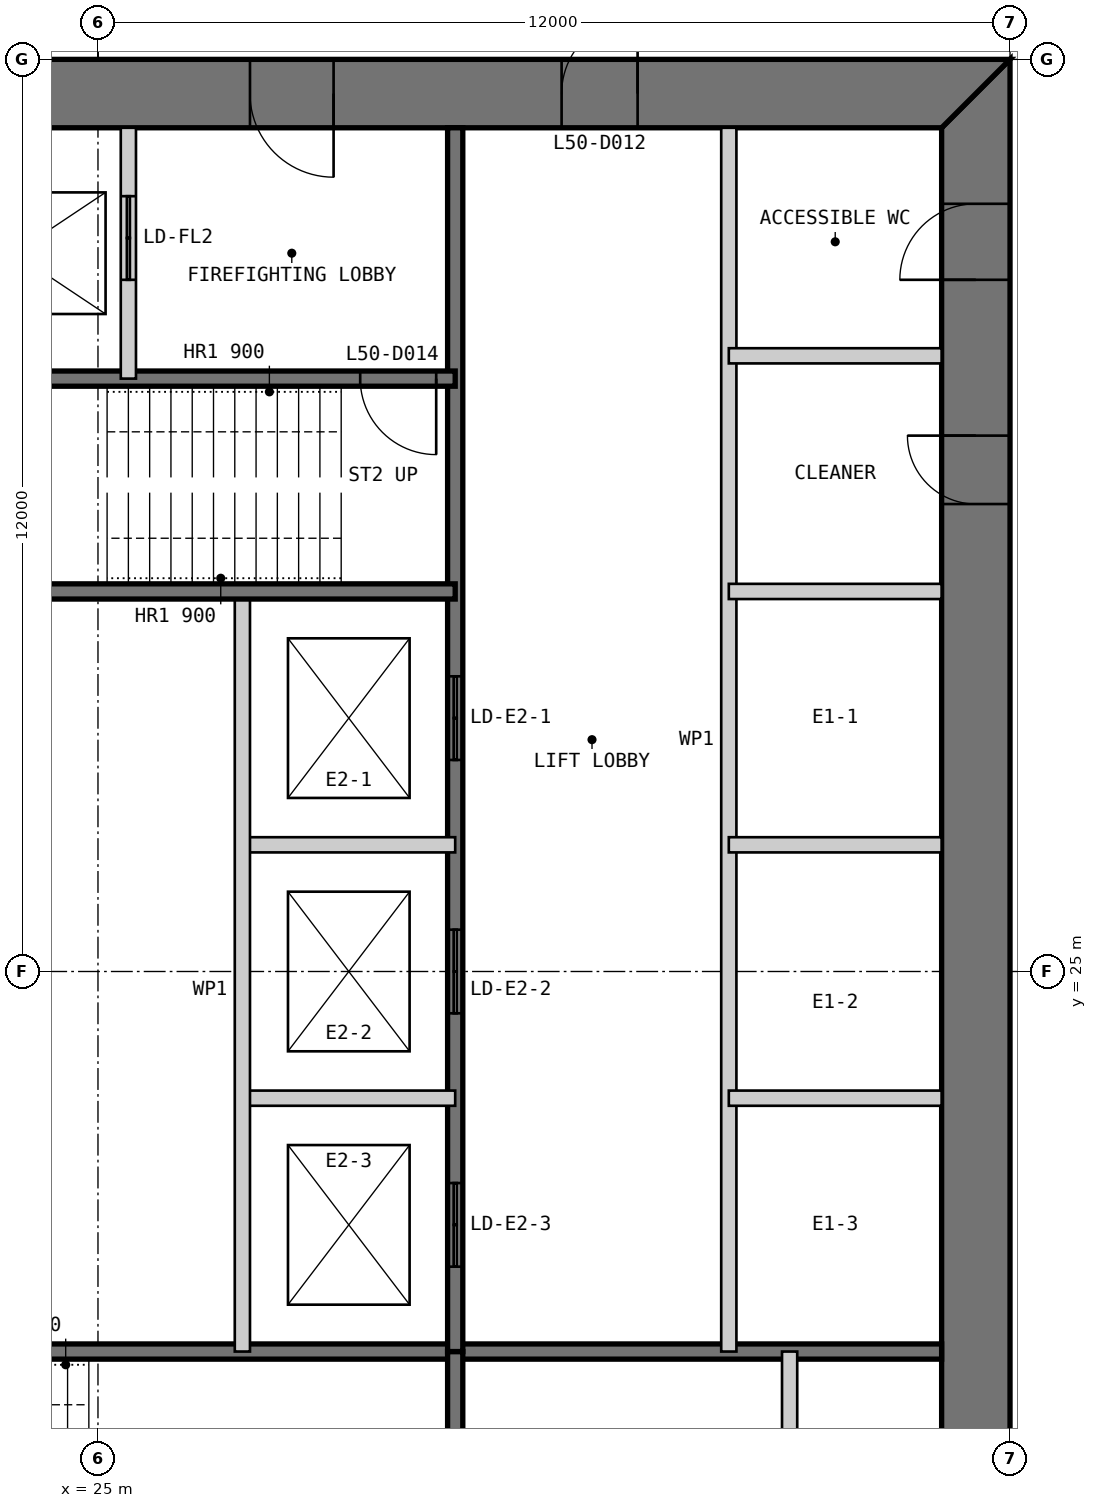
"""IFC4 building model, lengths in metres.
Left out: names, types, materials, properties, quantities, classifications, styles, units other than length and angle.
Written with IfcOpenShell. Run it as: python <this file> out.ifc"""

import sys

from ifc_helpers import new_model, si_unit, direction, frame, frame_2d, origin, place, context, subcontext, project, spatial, polyline, rectangle, outline, extrude, element, fill, save


model = new_model("IFC4")
c1 = context("Model", 3, precision=1e-05, world=origin(), true_north=direction((0.0, 1.0)))
c2 = subcontext(c1, "Body", "Model", "MODEL_VIEW")
j1 = project(units=[si_unit("LENGTHUNIT", "METRE"), si_unit("PLANEANGLEUNIT", "RADIAN")], contexts=[c1])
p1 = place(None, origin())
s1 = spatial("IfcSite", under=j1, at=p1, CompositionType="ELEMENT")
p2 = place(p1, origin())
s2 = spatial("IfcBuilding", under=s1, at=p2, CompositionType="ELEMENT")
p3 = place(p2, frame((0.0, 0.0, 213.8)))
s3 = spatial("IfcBuildingStorey", under=s2, at=p3, CompositionType="ELEMENT", Elevation=213.8)
p4 = place(p3, frame((36.55, 13.9, 0.0), z_axis=(0.0, 0.0, 1.0), x_axis=(0.0, 1.0, 0.0)))
e1 = element("IfcWall", 1, at=p4, inside=s3, PredefinedType="SHEAR", context=c2, shape_type="SweptSolid", body=[
    extrude(outline(polyline([(-0.9, -0.45), (23.1, -0.45), (22.2, 0.45), (0.0, 0.45), (-0.9, -0.45)])), origin(), (0.0, 0.0, 1.0), 4.0),
])
p5 = place(p4, frame((20.2, 0.0, 0.0)))
e2 = element("IfcOpeningElement", 2, at=p5, cuts=e1, PredefinedType="OPENING", context=c2, shape_type="SweptSolid", body=[
    extrude(rectangle(XDim=1.0, YDim=2.2, at=frame_2d((0.5, 1.1))), frame((0.0, 0.46, 0.0), z_axis=(0.0, -1.0, 0.0), x_axis=(1.0, 0.0, 0.0)), (0.0, 0.0, 1.0), 0.92),
])
p6 = place(p4, frame((17.25, 0.0, 0.0)))
e3 = element("IfcOpeningElement", 3, at=p6, cuts=e1, PredefinedType="OPENING", context=c2, shape_type="SweptSolid", body=[
    extrude(rectangle(XDim=0.9, YDim=2.2, at=frame_2d((0.45, 1.1))), frame((0.0, 0.46, 0.0), z_axis=(0.0, -1.0, 0.0), x_axis=(1.0, 0.0, 0.0)), (0.0, 0.0, 1.0), 0.92),
])
p7 = place(p3, frame((37.0, 36.55, 0.0), z_axis=(0.0, 0.0, 1.0), x_axis=(-1.0, 0.0, 0.0)))
e4 = element("IfcWall", 4, at=p7, inside=s3, PredefinedType="SHEAR", context=c2, shape_type="SweptSolid", body=[
    extrude(outline(polyline([(0.0, -0.45), (24.0, -0.45), (23.1, 0.45), (0.9, 0.45), (0.0, -0.45)])), origin(), (0.0, 0.0, 1.0), 4.0),
])
p8 = place(p7, frame((4.9, 0.0, 0.0)))
e5 = element("IfcOpeningElement", 5, at=p8, cuts=e4, PredefinedType="OPENING", context=c2, shape_type="SweptSolid", body=[
    extrude(rectangle(XDim=1.0, YDim=2.2, at=frame_2d((0.5, 1.1))), frame((0.0, 0.46, 0.0), z_axis=(0.0, -1.0, 0.0), x_axis=(1.0, 0.0, 0.0)), (0.0, 0.0, 1.0), 0.92),
])
p9 = place(p7, frame((8.9, 0.0, 0.0)))
e6 = element("IfcOpeningElement", 6, at=p9, cuts=e4, PredefinedType="OPENING", context=c2, shape_type="SweptSolid", body=[
    extrude(rectangle(XDim=1.1, YDim=2.2, at=frame_2d((0.55, 1.1))), frame((0.0, 0.46, 0.0), z_axis=(0.0, -1.0, 0.0), x_axis=(1.0, 0.0, 0.0)), (0.0, 0.0, 1.0), 0.92),
])
p10 = place(p7, frame((15.05, 0.0, 0.0)))
e7 = element("IfcOpeningElement", 7, at=p10, cuts=e4, PredefinedType="OPENING", context=c2, shape_type="SweptSolid", body=[
    extrude(rectangle(XDim=0.9, YDim=2.2, at=frame_2d((0.45, 1.1))), frame((0.0, 0.46, 0.0), z_axis=(0.0, -1.0, 0.0), x_axis=(1.0, 0.0, 0.0)), (0.0, 0.0, 1.0), 0.92),
])
p11 = place(p7, frame((17.9, 0.0, 0.0)))
e8 = element("IfcOpeningElement", 8, at=p11, cuts=e4, PredefinedType="OPENING", context=c2, shape_type="SweptSolid", body=[
    extrude(rectangle(XDim=1.0, YDim=2.2, at=frame_2d((0.5, 1.1))), frame((0.0, 0.46, 0.0), z_axis=(0.0, -1.0, 0.0), x_axis=(1.0, 0.0, 0.0)), (0.0, 0.0, 1.0), 0.92),
])
p12 = place(p7, frame((21.4, 0.0, 0.0)))
e9 = element("IfcOpeningElement", 9, at=p12, cuts=e4, PredefinedType="OPENING", context=c2, shape_type="SweptSolid", body=[
    extrude(rectangle(XDim=1.0, YDim=2.2, at=frame_2d((0.5, 1.1))), frame((0.0, 0.46, 0.0), z_axis=(0.0, -1.0, 0.0), x_axis=(1.0, 0.0, 0.0)), (0.0, 0.0, 1.0), 0.92),
])
p13 = place(p3, frame((20.3, 20.0, 0.0), z_axis=(0.0, 0.0, 1.0), x_axis=(1.0, 0.0, 0.0)))
e10 = element("IfcWall", 10, at=p13, inside=s3, PredefinedType="SOLIDWALL", context=c2, shape_type="SweptSolid", body=[
    extrude(rectangle(XDim=15.8, YDim=0.2, at=frame_2d((7.9, 0.0))), origin(), (0.0, 0.0, 1.0), 3.8),
])
p14 = place(p3, frame((29.7, 13.9, 0.0), z_axis=(0.0, 0.0, 1.0), x_axis=(0.0, 1.0, 0.0)))
e11 = element("IfcWall", 11, at=p14, inside=s3, PredefinedType="SOLIDWALL", context=c2, shape_type="SweptSolid", body=[
    extrude(rectangle(XDim=6.1, YDim=0.2, at=frame_2d((3.05, 0.0))), origin(), (0.0, 0.0, 1.0), 3.8),
])
p15 = place(p3, frame((34.1, 13.9, 0.0), z_axis=(0.0, 0.0, 1.0), x_axis=(0.0, 1.0, 0.0)))
e12 = element("IfcWall", 12, at=p15, inside=s3, PredefinedType="PARTITIONING", context=c2, shape_type="SweptSolid", body=[
    extrude(rectangle(XDim=6.1, YDim=0.2, at=frame_2d((3.05, 0.0))), origin(), (0.0, 0.0, 1.0), 3.8),
])
p16 = place(p3, frame((33.3, 36.1, 0.0), z_axis=(0.0, 0.0, 1.0), x_axis=(0.0, -1.0, 0.0)))
e13 = element("IfcWall", 13, at=p16, inside=s3, PredefinedType="PARTITIONING", context=c2, shape_type="SweptSolid", body=[
    extrude(rectangle(XDim=16.1, YDim=0.2, at=frame_2d((8.05, 0.0))), origin(), (0.0, 0.0, 1.0), 3.8),
])
p17 = place(p3, frame((29.7, 36.1, 0.0), z_axis=(0.0, 0.0, 1.0), x_axis=(0.0, -1.0, 0.0)))
e14 = element("IfcWall", 14, at=p17, inside=s3, PredefinedType="SOLIDWALL", context=c2, shape_type="SweptSolid", body=[
    extrude(rectangle(XDim=16.1, YDim=0.2, at=frame_2d((8.05, 0.0))), origin(), (0.0, 0.0, 1.0), 3.8),
])
p18 = place(p17, frame((7.217, 0.0, 0.0)))
e15 = element("IfcOpeningElement", 15, at=p18, cuts=e14, PredefinedType="OPENING", context=c2, shape_type="SweptSolid", body=[
    extrude(rectangle(XDim=1.1, YDim=2.2, at=frame_2d((0.55, 1.1))), frame((0.0, 0.11, 0.0), z_axis=(0.0, -1.0, 0.0), x_axis=(1.0, 0.0, 0.0)), (0.0, 0.0, 1.0), 0.22),
])
p19 = place(p17, frame((10.55, 0.0, 0.0)))
e16 = element("IfcOpeningElement", 16, at=p19, cuts=e14, PredefinedType="OPENING", context=c2, shape_type="SweptSolid", body=[
    extrude(rectangle(XDim=1.1, YDim=2.2, at=frame_2d((0.55, 1.1))), frame((0.0, 0.11, 0.0), z_axis=(0.0, -1.0, 0.0), x_axis=(1.0, 0.0, 0.0)), (0.0, 0.0, 1.0), 0.22),
])
p20 = place(p17, frame((13.883, 0.0, 0.0)))
e17 = element("IfcOpeningElement", 17, at=p20, cuts=e14, PredefinedType="OPENING", context=c2, shape_type="SweptSolid", body=[
    extrude(rectangle(XDim=1.1, YDim=2.2, at=frame_2d((0.55, 1.1))), frame((0.0, 0.11, 0.0), z_axis=(0.0, -1.0, 0.0), x_axis=(1.0, 0.0, 0.0)), (0.0, 0.0, 1.0), 0.22),
])
for number, where, z_axis, x_axis in (
    (18, (36.1, 30.0, 0.0), (0.0, 0.0, 1.0), (-1.0, 0.0, 0.0)),
    (19, (36.1, 26.667, 0.0), (0.0, 0.0, 1.0), (-1.0, 0.0, 0.0)),
    (20, (36.1, 23.333, 0.0), (0.0, 0.0, 1.0), (-1.0, 0.0, 0.0)),
    (21, (29.7, 26.667, 0.0), (0.0, 0.0, 1.0), (-1.0, 0.0, 0.0)),
    (22, (29.7, 23.333, 0.0), (0.0, 0.0, 1.0), (-1.0, 0.0, 0.0)),
):
    element("IfcWall", number, at=place(p3, frame(where, z_axis=z_axis, x_axis=x_axis)), inside=s3, PredefinedType="PARTITIONING", context=c2, shape_type="SweptSolid", body=[
        extrude(rectangle(XDim=2.8, YDim=0.2, at=frame_2d((1.4, 0.0))), origin(), (0.0, 0.0, 1.0), 3.8),
    ])
p21 = place(p3, frame((26.9, 30.0, 0.0), z_axis=(0.0, 0.0, 1.0), x_axis=(0.0, -1.0, 0.0)))
e23 = element("IfcWall", 23, at=p21, inside=s3, PredefinedType="PARTITIONING", context=c2, shape_type="SweptSolid", body=[
    extrude(rectangle(XDim=10.0, YDim=0.2, at=frame_2d((5.0, 0.0))), origin(), (0.0, 0.0, 1.0), 3.8),
])
p22 = place(p3, frame((29.7, 32.8, 0.0), z_axis=(0.0, 0.0, 1.0), x_axis=(-1.0, 0.0, 0.0)))
e24 = element("IfcWall", 24, at=p22, inside=s3, PredefinedType="SOLIDWALL", context=c2, shape_type="SweptSolid", body=[
    extrude(rectangle(XDim=9.4, YDim=0.2, at=frame_2d((4.7, 0.0))), origin(), (0.0, 0.0, 1.0), 3.8),
])
p23 = place(p22, frame((0.25, 0.0, 0.0)))
e25 = element("IfcOpeningElement", 25, at=p23, cuts=e24, PredefinedType="OPENING", context=c2, shape_type="SweptSolid", body=[
    extrude(rectangle(XDim=1.0, YDim=2.2, at=frame_2d((0.5, 1.1))), frame((0.0, 0.11, 0.0), z_axis=(0.0, -1.0, 0.0), x_axis=(1.0, 0.0, 0.0)), (0.0, 0.0, 1.0), 0.22),
])
p24 = place(p3, frame((29.7, 30.0, 0.0), z_axis=(0.0, 0.0, 1.0), x_axis=(-1.0, 0.0, 0.0)))
e26 = element("IfcWall", 26, at=p24, inside=s3, PredefinedType="SOLIDWALL", context=c2, shape_type="SweptSolid", body=[
    extrude(rectangle(XDim=15.8, YDim=0.2, at=frame_2d((7.9, 0.0))), origin(), (0.0, 0.0, 1.0), 3.8),
])
p25 = place(p3, frame((25.4, 36.1, 0.0), z_axis=(0.0, 0.0, 1.0), x_axis=(0.0, -1.0, 0.0)))
e27 = element("IfcWall", 27, at=p25, inside=s3, PredefinedType="PARTITIONING", context=c2, shape_type="SweptSolid", body=[
    extrude(rectangle(XDim=3.3, YDim=0.2, at=frame_2d((1.65, 0.0))), origin(), (0.0, 0.0, 1.0), 3.8),
])
p26 = place(p25, frame((0.9, 0.0, 0.0)))
e28 = element("IfcOpeningElement", 28, at=p26, cuts=e27, PredefinedType="OPENING", context=c2, shape_type="SweptSolid", body=[
    extrude(rectangle(XDim=1.1, YDim=2.2, at=frame_2d((0.55, 1.1))), frame((0.0, 0.11, 0.0), z_axis=(0.0, -1.0, 0.0), x_axis=(1.0, 0.0, 0.0)), (0.0, 0.0, 1.0), 0.22),
])
p27 = place(p3, frame((36.1, 33.1, 0.0), z_axis=(0.0, 0.0, 1.0), x_axis=(-1.0, 0.0, 0.0)))
e29 = element("IfcWall", 29, at=p27, inside=s3, PredefinedType="PARTITIONING", context=c2, shape_type="SweptSolid", body=[
    extrude(rectangle(XDim=2.8, YDim=0.2, at=frame_2d((1.4, 0.0))), origin(), (0.0, 0.0, 1.0), 3.8),
])
p28 = place(p8, frame((1.0, 0.0, 0.0), z_axis=(0.0, 0.0, 1.0), x_axis=(-1.0, 0.0, 0.0)))
e30 = element("IfcDoor", 30, at=p28, inside=s3, OperationType="SINGLE_SWING_RIGHT", PredefinedType="DOOR", context=c2, shape_type="SweptSolid", body=[
    extrude(rectangle(XDim=1.0, YDim=2.2, at=frame_2d((0.5, 1.1))), frame((0.0, 0.025, 0.0), z_axis=(0.0, -1.0, 0.0), x_axis=(1.0, 0.0, 0.0)), (0.0, 0.0, 1.0), 0.05),
    extrude(outline(polyline([(0.0, 0.0), (0.04, 0.0), (0.04, 2.16), (0.96, 2.16), (0.96, 0.0), (1.0, 0.0), (1.0, 2.2), (0.0, 2.2), (0.0, 0.0)])), frame((0.0, 0.3, 0.0), z_axis=(0.0, -1.0, 0.0), x_axis=(1.0, 0.0, 0.0)), (0.0, 0.0, 1.0), 0.6),
])
fill(e5, e30)
p29 = place(p9, origin())
e31 = element("IfcDoor", 31, at=p29, inside=s3, OperationType="SINGLE_SWING_LEFT", PredefinedType="DOOR", context=c2, shape_type="SweptSolid", body=[
    extrude(rectangle(XDim=1.1, YDim=2.2, at=frame_2d((0.55, 1.1))), frame((0.0, 0.025, 0.0), z_axis=(0.0, -1.0, 0.0), x_axis=(1.0, 0.0, 0.0)), (0.0, 0.0, 1.0), 0.05),
    extrude(outline(polyline([(0.0, 0.0), (0.04, 0.0), (0.04, 2.16), (1.06, 2.16), (1.06, 0.0), (1.1, 0.0), (1.1, 2.2), (0.0, 2.2), (0.0, 0.0)])), frame((0.0, 0.3, 0.0), z_axis=(0.0, -1.0, 0.0), x_axis=(1.0, 0.0, 0.0)), (0.0, 0.0, 1.0), 0.6),
])
fill(e6, e31)
p30 = place(p23, origin())
e32 = element("IfcDoor", 32, at=p30, inside=s3, OperationType="SINGLE_SWING_LEFT", PredefinedType="DOOR", context=c2, shape_type="SweptSolid", body=[
    extrude(rectangle(XDim=1.0, YDim=2.2, at=frame_2d((0.5, 1.1))), frame((0.0, 0.025, 0.0), z_axis=(0.0, -1.0, 0.0), x_axis=(1.0, 0.0, 0.0)), (0.0, 0.0, 1.0), 0.05),
])
fill(e25, e32)
p31 = place(p5, origin())
e33 = element("IfcDoor", 33, at=p31, inside=s3, OperationType="SINGLE_SWING_LEFT", PredefinedType="DOOR", context=c2, shape_type="SweptSolid", body=[
    extrude(rectangle(XDim=1.0, YDim=2.2, at=frame_2d((0.5, 1.1))), frame((0.0, 0.025, 0.0), z_axis=(0.0, -1.0, 0.0), x_axis=(1.0, 0.0, 0.0)), (0.0, 0.0, 1.0), 0.05),
    extrude(outline(polyline([(0.0, 0.0), (0.04, 0.0), (0.04, 2.16), (0.96, 2.16), (0.96, 0.0), (1.0, 0.0), (1.0, 2.2), (0.0, 2.2), (0.0, 0.0)])), frame((0.0, 0.3, 0.0), z_axis=(0.0, -1.0, 0.0), x_axis=(1.0, 0.0, 0.0)), (0.0, 0.0, 1.0), 0.6),
])
fill(e2, e33)
p32 = place(p6, origin())
e34 = element("IfcDoor", 34, at=p32, inside=s3, OperationType="SINGLE_SWING_RIGHT", PredefinedType="DOOR", context=c2, shape_type="SweptSolid", body=[
    extrude(rectangle(XDim=0.9, YDim=2.2, at=frame_2d((0.45, 1.1))), frame((0.0, 0.025, 0.0), z_axis=(0.0, -1.0, 0.0), x_axis=(1.0, 0.0, 0.0)), (0.0, 0.0, 1.0), 0.05),
    extrude(outline(polyline([(0.0, 0.0), (0.04, 0.0), (0.04, 2.16), (0.86, 2.16), (0.86, 0.0), (0.9, 0.0), (0.9, 2.2), (0.0, 2.2), (0.0, 0.0)])), frame((0.0, 0.3, 0.0), z_axis=(0.0, -1.0, 0.0), x_axis=(1.0, 0.0, 0.0)), (0.0, 0.0, 1.0), 0.6),
])
fill(e3, e34)
p33 = place(p26, origin())
e35 = element("IfcDoor", 35, at=p33, inside=s3, OperationType="DOUBLE_DOOR_SLIDING", PredefinedType="DOOR", context=c2, shape_type="SweptSolid", body=[
    extrude(rectangle(XDim=1.1, YDim=2.2, at=frame_2d((0.55, 1.1))), frame((0.0, 0.025, 0.0), z_axis=(0.0, -1.0, 0.0), x_axis=(1.0, 0.0, 0.0)), (0.0, 0.0, 1.0), 0.05),
])
fill(e28, e35)
p34 = place(p18, origin())
e36 = element("IfcDoor", 36, at=p34, inside=s3, OperationType="DOUBLE_DOOR_SLIDING", PredefinedType="DOOR", context=c2, shape_type="SweptSolid", body=[
    extrude(rectangle(XDim=1.1, YDim=2.2, at=frame_2d((0.55, 1.1))), frame((0.0, 0.025, 0.0), z_axis=(0.0, -1.0, 0.0), x_axis=(1.0, 0.0, 0.0)), (0.0, 0.0, 1.0), 0.05),
])
fill(e15, e36)
p35 = place(p19, origin())
e37 = element("IfcDoor", 37, at=p35, inside=s3, OperationType="DOUBLE_DOOR_SLIDING", PredefinedType="DOOR", context=c2, shape_type="SweptSolid", body=[
    extrude(rectangle(XDim=1.1, YDim=2.2, at=frame_2d((0.55, 1.1))), frame((0.0, 0.025, 0.0), z_axis=(0.0, -1.0, 0.0), x_axis=(1.0, 0.0, 0.0)), (0.0, 0.0, 1.0), 0.05),
])
fill(e16, e37)
p36 = place(p20, origin())
e38 = element("IfcDoor", 38, at=p36, inside=s3, OperationType="DOUBLE_DOOR_SLIDING", PredefinedType="DOOR", context=c2, shape_type="SweptSolid", body=[
    extrude(rectangle(XDim=1.1, YDim=2.2, at=frame_2d((0.55, 1.1))), frame((0.0, 0.025, 0.0), z_axis=(0.0, -1.0, 0.0), x_axis=(1.0, 0.0, 0.0)), (0.0, 0.0, 1.0), 0.05),
])
fill(e17, e38)
save(model, sys.argv[1])
